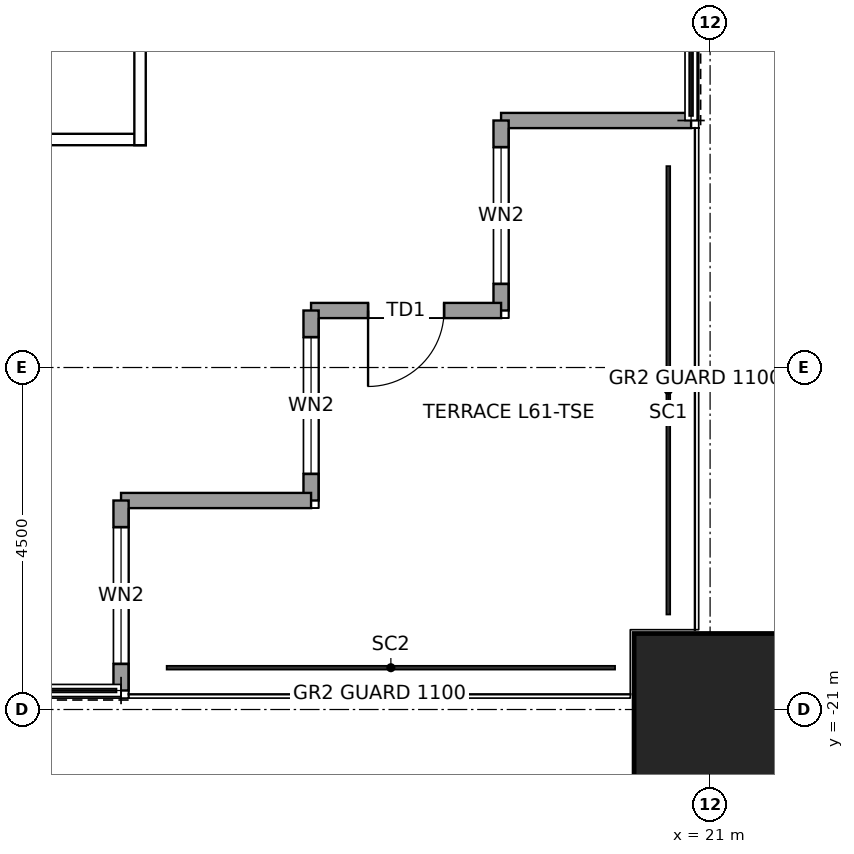
"""IFC4 building model, lengths in metres.
Left out: names, types, materials, properties, quantities, classifications, styles, units other than length and angle.
Written with IfcOpenShell. Run it as: python <this file> out.ifc"""

import sys

from ifc_helpers import new_model, si_unit, direction, frame, frame_2d, origin, origin_2d, place, context, subcontext, project, spatial, rectangle, hollow_rectangle, extrude, element, fill, save


model = new_model("IFC4")
c1 = context("Model", 3, precision=1e-05, world=origin(), true_north=direction((0.0, 1.0)))
c2 = subcontext(c1, "Body", "Model", "MODEL_VIEW")
j1 = project(units=[si_unit("LENGTHUNIT", "METRE"), si_unit("PLANEANGLEUNIT", "RADIAN")], contexts=[c1])
p1 = place(None, origin())
s1 = spatial("IfcSite", under=j1, at=p1, CompositionType="ELEMENT")
p2 = place(p1, origin())
s2 = spatial("IfcBuilding", under=s1, at=p2, CompositionType="ELEMENT")
p3 = place(p2, frame((0.0, 0.0, 279.9)))
s3 = spatial("IfcBuildingStorey", under=s2, at=p3, CompositionType="ELEMENT", Elevation=279.9)
p4 = place(p3, frame((21.0, -21.0, 0.0), z_axis=(0.0, 0.0, 1.0), x_axis=(1.0, 0.0, 0.0)))
e1 = element("IfcColumn", 1, at=p4, inside=s3, PredefinedType="COLUMN", context=c2, shape_type="SweptSolid", body=[
    extrude(hollow_rectangle(XDim=2.0, YDim=2.0, WallThickness=0.095, at=origin_2d()), origin(), (0.0, 0.0, 1.0), 4.0),
])
p5 = place(p3, frame((20.75, -13.25, 0.0), z_axis=(0.0, 0.0, 1.0), x_axis=(-1.0, 0.0, 0.0)))
e2 = element("IfcWall", 2, at=p5, inside=s3, PredefinedType="SOLIDWALL", context=c2, shape_type="SweptSolid", body=[
    extrude(rectangle(XDim=2.5, YDim=0.2, at=frame_2d((1.25, 0.0))), origin(), (0.0, 0.0, 1.0), 3.85),
])
p6 = place(p3, frame((18.25, -13.25, 0.0), z_axis=(0.0, 0.0, 1.0), x_axis=(0.0, -1.0, 0.0)))
e3 = element("IfcWall", 3, at=p6, inside=s3, PredefinedType="SOLIDWALL", context=c2, shape_type="SweptSolid", body=[
    extrude(rectangle(XDim=2.5, YDim=0.2, at=frame_2d((1.25, 0.0))), origin(), (0.0, 0.0, 1.0), 3.85),
])
p7 = place(p6, frame((0.35, 0.0, 0.3)))
e4 = element("IfcOpeningElement", 4, at=p7, cuts=e3, PredefinedType="OPENING", context=c2, shape_type="SweptSolid", body=[
    extrude(rectangle(XDim=1.8, YDim=2.4, at=frame_2d((0.9, 1.2))), frame((0.0, 0.11, 0.0), z_axis=(0.0, -1.0, 0.0), x_axis=(1.0, 0.0, 0.0)), (0.0, 0.0, 1.0), 0.22),
])
p8 = place(p3, frame((18.25, -15.75, 0.0), z_axis=(0.0, 0.0, 1.0), x_axis=(-1.0, 0.0, 0.0)))
e5 = element("IfcWall", 5, at=p8, inside=s3, PredefinedType="SOLIDWALL", context=c2, shape_type="SweptSolid", body=[
    extrude(rectangle(XDim=2.5, YDim=0.2, at=frame_2d((1.25, 0.0))), origin(), (0.0, 0.0, 1.0), 3.317),
])
p9 = place(p8, frame((0.75, 0.0, 0.0)))
e6 = element("IfcOpeningElement", 6, at=p9, cuts=e5, PredefinedType="OPENING", context=c2, shape_type="SweptSolid", body=[
    extrude(rectangle(XDim=1.0, YDim=2.4, at=frame_2d((0.5, 1.2))), frame((0.0, 0.11, 0.0), z_axis=(0.0, -1.0, 0.0), x_axis=(1.0, 0.0, 0.0)), (0.0, 0.0, 1.0), 0.22),
])
p10 = place(p3, frame((15.75, -15.75, 0.0), z_axis=(0.0, 0.0, 1.0), x_axis=(0.0, -1.0, 0.0)))
e7 = element("IfcWall", 7, at=p10, inside=s3, PredefinedType="SOLIDWALL", context=c2, shape_type="SweptSolid", body=[
    extrude(rectangle(XDim=2.5, YDim=0.2, at=frame_2d((1.25, 0.0))), origin(), (0.0, 0.0, 1.0), 3.85),
])
p11 = place(p10, frame((0.35, 0.0, 0.3)))
e8 = element("IfcOpeningElement", 8, at=p11, cuts=e7, PredefinedType="OPENING", context=c2, shape_type="SweptSolid", body=[
    extrude(rectangle(XDim=1.8, YDim=2.4, at=frame_2d((0.9, 1.2))), frame((0.0, 0.11, 0.0), z_axis=(0.0, -1.0, 0.0), x_axis=(1.0, 0.0, 0.0)), (0.0, 0.0, 1.0), 0.22),
])
p12 = place(p3, frame((15.75, -18.25, 0.0), z_axis=(0.0, 0.0, 1.0), x_axis=(-1.0, 0.0, 0.0)))
e9 = element("IfcWall", 9, at=p12, inside=s3, PredefinedType="SOLIDWALL", context=c2, shape_type="SweptSolid", body=[
    extrude(rectangle(XDim=2.5, YDim=0.2, at=frame_2d((1.25, 0.0))), origin(), (0.0, 0.0, 1.0), 3.85),
])
p13 = place(p3, frame((13.25, -18.25, 0.0), z_axis=(0.0, 0.0, 1.0), x_axis=(0.0, -1.0, 0.0)))
e10 = element("IfcWall", 10, at=p13, inside=s3, PredefinedType="SOLIDWALL", context=c2, shape_type="SweptSolid", body=[
    extrude(rectangle(XDim=2.5, YDim=0.2, at=frame_2d((1.25, 0.0))), origin(), (0.0, 0.0, 1.0), 3.85),
])
p14 = place(p13, frame((0.35, 0.0, 0.3)))
e11 = element("IfcOpeningElement", 11, at=p14, cuts=e10, PredefinedType="OPENING", context=c2, shape_type="SweptSolid", body=[
    extrude(rectangle(XDim=1.8, YDim=2.4, at=frame_2d((0.9, 1.2))), frame((0.0, 0.11, 0.0), z_axis=(0.0, -1.0, 0.0), x_axis=(1.0, 0.0, 0.0)), (0.0, 0.0, 1.0), 0.22),
])
p15 = place(p3, frame((2.425, -13.5, 0.0), z_axis=(0.0, 0.0, 1.0), x_axis=(1.0, 0.0, 0.0)))
e12 = element("IfcWall", 12, at=p15, inside=s3, PredefinedType="PARTITIONING", context=c2, shape_type="SweptSolid", body=[
    extrude(rectangle(XDim=11.15, YDim=0.15, at=frame_2d((5.575, 0.0))), origin(), (0.0, 0.0, 1.0), 3.85),
])
p16 = place(p3, frame((13.5, -13.575, 0.0), z_axis=(0.0, 0.0, 1.0), x_axis=(0.0, 1.0, 0.0)))
e13 = element("IfcWall", 13, at=p16, inside=s3, PredefinedType="PARTITIONING", context=c2, shape_type="SweptSolid", body=[
    extrude(rectangle(XDim=27.15, YDim=0.15, at=frame_2d((13.575, 0.0))), origin(), (0.0, 0.0, 1.0), 3.85),
])
p17 = place(p7, origin())
e14 = element("IfcWindow", 14, at=p17, inside=s3, PartitioningType="SINGLE_PANEL", PredefinedType="WINDOW", context=c2, shape_type="SweptSolid", body=[
    extrude(rectangle(XDim=1.8, YDim=2.4, at=frame_2d((0.9, 1.2))), frame((0.0, 0.03, 0.0), z_axis=(0.0, -1.0, 0.0), x_axis=(1.0, 0.0, 0.0)), (0.0, 0.0, 1.0), 0.06),
])
fill(e4, e14)
p18 = place(p9, origin())
e15 = element("IfcDoor", 15, at=p18, inside=s3, OperationType="SINGLE_SWING_RIGHT", PredefinedType="DOOR", context=c2, shape_type="SweptSolid", body=[
    extrude(rectangle(XDim=1.0, YDim=2.4, at=frame_2d((0.5, 1.2))), frame((0.0, 0.025, 0.0), z_axis=(0.0, -1.0, 0.0), x_axis=(1.0, 0.0, 0.0)), (0.0, 0.0, 1.0), 0.05),
])
fill(e6, e15)
p19 = place(p11, origin())
e16 = element("IfcWindow", 16, at=p19, inside=s3, PartitioningType="SINGLE_PANEL", PredefinedType="WINDOW", context=c2, shape_type="SweptSolid", body=[
    extrude(rectangle(XDim=1.8, YDim=2.4, at=frame_2d((0.9, 1.2))), frame((0.0, 0.03, 0.0), z_axis=(0.0, -1.0, 0.0), x_axis=(1.0, 0.0, 0.0)), (0.0, 0.0, 1.0), 0.06),
])
fill(e8, e16)
p20 = place(p14, origin())
e17 = element("IfcWindow", 17, at=p20, inside=s3, PartitioningType="SINGLE_PANEL", PredefinedType="WINDOW", context=c2, shape_type="SweptSolid", body=[
    extrude(rectangle(XDim=1.8, YDim=2.4, at=frame_2d((0.9, 1.2))), frame((0.0, 0.03, 0.0), z_axis=(0.0, -1.0, 0.0), x_axis=(1.0, 0.0, 0.0)), (0.0, 0.0, 1.0), 0.06),
])
fill(e11, e17)
save(model, sys.argv[1])
